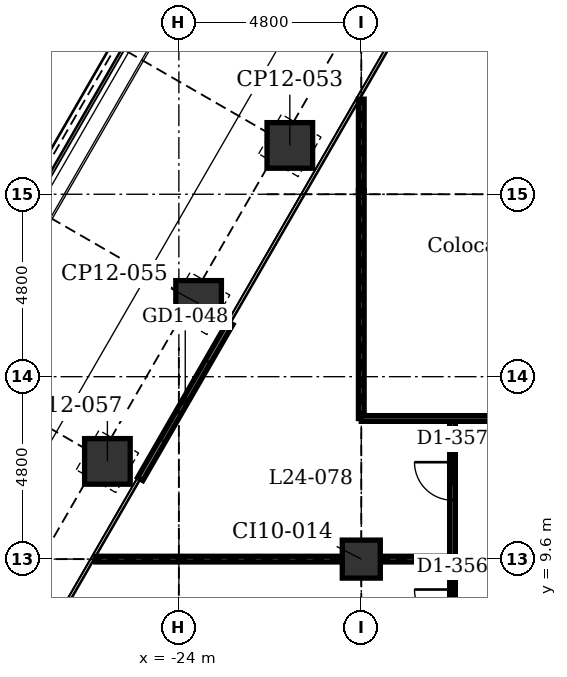
"""IFC4 building model, lengths in metres.
Left out: names, types, materials, properties, quantities, classifications, styles, units other than length and angle.
Written with IfcOpenShell. Run it as: python <this file> out.ifc"""

import sys

from ifc_helpers import new_model, si_unit, direction, frame, frame_2d, origin, origin_2d, place, context, subcontext, project, spatial, rectangle, extrude, element, fill, save


model = new_model("IFC4")
c1 = context("Model", 3, precision=1e-05, world=origin(), true_north=direction((0.0, 1.0)))
c2 = subcontext(c1, "Body", "Model", "MODEL_VIEW")
j1 = project(units=[si_unit("LENGTHUNIT", "METRE"), si_unit("PLANEANGLEUNIT", "RADIAN")], contexts=[c1])
p1 = place(None, origin())
s1 = spatial("IfcSite", under=j1, at=p1, CompositionType="ELEMENT")
p2 = place(p1, origin())
s2 = spatial("IfcBuilding", under=s1, at=p2, CompositionType="ELEMENT")
p3 = place(p2, frame((0.0, 0.0, 122.9)))
s3 = spatial("IfcBuildingStorey", under=s2, at=p3, CompositionType="ELEMENT", Elevation=122.9)
for number, where, z_axis, x_axis in (
    (1, (-25.88, 12.171, -0.2), (0.0, 0.0, 1.0), (0.5, 0.866, 0.0)),
    (2, (-23.48, 16.328, -0.2), (0.0, 0.0, 1.0), (0.5, 0.866, 0.0)),
    (3, (-21.08, 20.485, -0.2), (0.0, 0.0, 1.0), (0.5, 0.866, 0.0)),
):
    element("IfcColumn", number, at=place(p3, frame(where, z_axis=z_axis, x_axis=x_axis)), inside=s3, PredefinedType="COLUMN", context=c2, shape_type="SweptSolid", body=[
        extrude(rectangle(XDim=1.2, YDim=1.2, at=origin_2d()), origin(), (0.0, 0.0, 1.0), 4.4),
    ])
p4 = place(p3, frame((-19.2, 9.6, -0.2), z_axis=(0.0, 0.0, 1.0), x_axis=(1.0, 0.0, 0.0)))
e4 = element("IfcColumn", 4, at=p4, inside=s3, PredefinedType="COLUMN", context=c2, shape_type="SweptSolid", body=[
    extrude(rectangle(XDim=1.0, YDim=1.0, at=origin_2d()), origin(), (0.0, 0.0, 1.0), 4.4),
])
p5 = place(p3, frame((-25.017, 11.707, 0.0), z_axis=(0.0, 0.0, 1.0), x_axis=(0.499978080042, 0.866038058908, 0.0)))
e5 = element("IfcWall", 5, at=p5, inside=s3, PredefinedType="PARTITIONING", context=c2, shape_type="SweptSolid", body=[
    extrude(rectangle(XDim=4.74, YDim=0.16, at=frame_2d((2.37, 0.0))), origin(), (0.0, 0.0, 1.0), 4.2),
])
p6 = place(p5, frame((1.17, 0.0, 0.0)))
e6 = element("IfcOpeningElement", 6, at=p6, cuts=e5, PredefinedType="OPENING", context=c2, shape_type="SweptSolid", body=[
    extrude(rectangle(XDim=2.4, YDim=2.4, at=frame_2d((1.2, 1.2))), frame((0.0, 0.09, 0.0), z_axis=(0.0, -1.0, 0.0), x_axis=(1.0, 0.0, 0.0)), (0.0, 0.0, 1.0), 0.18),
])
p7 = place(p3, frame((-16.8, 3.95, 0.0), z_axis=(0.0, 0.0, 1.0), x_axis=(0.0, 1.0, 0.0)))
e7 = element("IfcWall", 7, at=p7, inside=s3, PredefinedType="PARTITIONING", context=c2, shape_type="SweptSolid", body=[
    extrude(rectangle(XDim=9.35, YDim=0.15, at=frame_2d((4.675, 0.0))), origin(), (0.0, 0.0, 1.0), 4.2),
])
p8 = place(p7, frame((0.625, 0.0, 0.0)))
e8 = element("IfcOpeningElement", 8, at=p8, cuts=e7, PredefinedType="OPENING", context=c2, shape_type="SweptSolid", body=[
    extrude(rectangle(XDim=1.0, YDim=2.1, at=frame_2d((0.5, 1.05))), frame((0.0, 0.085, 0.0), z_axis=(0.0, -1.0, 0.0), x_axis=(1.0, 0.0, 0.0)), (0.0, 0.0, 1.0), 0.17),
])
p9 = place(p7, frame((3.85, 0.0, 0.0)))
e9 = element("IfcOpeningElement", 9, at=p9, cuts=e7, PredefinedType="OPENING", context=c2, shape_type="SweptSolid", body=[
    extrude(rectangle(XDim=1.0, YDim=2.1, at=frame_2d((0.5, 1.05))), frame((0.0, 0.085, 0.0), z_axis=(0.0, -1.0, 0.0), x_axis=(1.0, 0.0, 0.0)), (0.0, 0.0, 1.0), 0.17),
])
p10 = place(p7, frame((7.2, 0.0, 0.0)))
e10 = element("IfcOpeningElement", 10, at=p10, cuts=e7, PredefinedType="OPENING", context=c2, shape_type="SweptSolid", body=[
    extrude(rectangle(XDim=1.0, YDim=2.1, at=frame_2d((0.5, 1.05))), frame((0.0, 0.085, 0.0), z_axis=(0.0, -1.0, 0.0), x_axis=(1.0, 0.0, 0.0)), (0.0, 0.0, 1.0), 0.17),
])
p11 = place(p3, frame((-19.2, 13.3, 0.0), z_axis=(0.0, 0.0, 1.0), x_axis=(0.0, 1.0, 0.0)))
e11 = element("IfcWall", 11, at=p11, inside=s3, PredefinedType="PARTITIONING", context=c2, shape_type="SweptSolid", body=[
    extrude(rectangle(XDim=5.993, YDim=0.15, at=frame_2d((2.997, 0.0))), origin(), (0.0, 0.0, 1.0), 3.743),
])
p12 = place(p3, frame((-19.2, 19.293, 0.0), z_axis=(0.0, 0.0, 1.0), x_axis=(0.0, 1.0, 0.0)))
e12 = element("IfcWall", 12, at=p12, inside=s3, PredefinedType="PARTITIONING", context=c2, shape_type="SweptSolid", body=[
    extrude(rectangle(XDim=2.408, YDim=0.15, at=frame_2d((1.204, 0.0))), origin(), (0.0, 0.0, 1.0), 3.89),
])
p13 = place(p3, frame((-26.187, 9.6, 0.0), z_axis=(0.0, 0.0, 1.0), x_axis=(1.0, 0.0, 0.0)))
e13 = element("IfcWall", 13, at=p13, inside=s3, PredefinedType="PARTITIONING", context=c2, shape_type="SweptSolid", body=[
    extrude(rectangle(XDim=6.487, YDim=0.15, at=frame_2d((3.243, 0.0))), origin(), (0.0, 0.0, 1.0), 3.592),
])
p14 = place(p3, frame((-18.7, 9.6, 0.0), z_axis=(0.0, 0.0, 1.0), x_axis=(1.0, 0.0, 0.0)))
e14 = element("IfcWall", 14, at=p14, inside=s3, PredefinedType="PARTITIONING", context=c2, shape_type="SweptSolid", body=[
    extrude(rectangle(XDim=1.9, YDim=0.15, at=frame_2d((0.95, 0.0))), origin(), (0.0, 0.0, 1.0), 3.592),
])
p15 = place(p3, frame((-19.2, 13.3, 0.0), z_axis=(0.0, 0.0, 1.0), x_axis=(1.0, 0.0, 0.0)))
e15 = element("IfcWall", 15, at=p15, inside=s3, PredefinedType="PARTITIONING", context=c2, shape_type="SweptSolid", body=[
    extrude(rectangle(XDim=36.0, YDim=0.15, at=frame_2d((18.0, 0.0))), origin(), (0.0, 0.0, 1.0), 4.2),
])
p16 = place(p15, frame((4.3, 0.0, 0.0)))
e16 = element("IfcOpeningElement", 16, at=p16, cuts=e15, PredefinedType="OPENING", context=c2, shape_type="SweptSolid", body=[
    extrude(rectangle(XDim=1.0, YDim=2.1, at=frame_2d((0.5, 1.05))), frame((0.0, 0.085, 0.0), z_axis=(0.0, -1.0, 0.0), x_axis=(1.0, 0.0, 0.0)), (0.0, 0.0, 1.0), 0.17),
])
p17 = place(p15, frame((7.9, 0.0, 0.0)))
e17 = element("IfcOpeningElement", 17, at=p17, cuts=e15, PredefinedType="OPENING", context=c2, shape_type="SweptSolid", body=[
    extrude(rectangle(XDim=1.0, YDim=2.1, at=frame_2d((0.5, 1.05))), frame((0.0, 0.085, 0.0), z_axis=(0.0, -1.0, 0.0), x_axis=(1.0, 0.0, 0.0)), (0.0, 0.0, 1.0), 0.17),
])
p18 = place(p15, frame((11.935, 0.0, 0.0)))
e18 = element("IfcOpeningElement", 18, at=p18, cuts=e15, PredefinedType="OPENING", context=c2, shape_type="SweptSolid", body=[
    extrude(rectangle(XDim=1.0, YDim=2.1, at=frame_2d((0.5, 1.05))), frame((0.0, 0.085, 0.0), z_axis=(0.0, -1.0, 0.0), x_axis=(1.0, 0.0, 0.0)), (0.0, 0.0, 1.0), 0.17),
])
p19 = place(p15, frame((15.1, 0.0, 0.0)))
e19 = element("IfcOpeningElement", 19, at=p19, cuts=e15, PredefinedType="OPENING", context=c2, shape_type="SweptSolid", body=[
    extrude(rectangle(XDim=1.0, YDim=2.1, at=frame_2d((0.5, 1.05))), frame((0.0, 0.085, 0.0), z_axis=(0.0, -1.0, 0.0), x_axis=(1.0, 0.0, 0.0)), (0.0, 0.0, 1.0), 0.17),
])
p20 = place(p15, frame((17.675, 0.0, 0.0)))
e20 = element("IfcOpeningElement", 20, at=p20, cuts=e15, PredefinedType="OPENING", context=c2, shape_type="SweptSolid", body=[
    extrude(rectangle(XDim=1.0, YDim=2.1, at=frame_2d((0.5, 1.05))), frame((0.0, 0.085, 0.0), z_axis=(0.0, -1.0, 0.0), x_axis=(1.0, 0.0, 0.0)), (0.0, 0.0, 1.0), 0.17),
])
p21 = place(p15, frame((19.9, 0.0, 0.0)))
e21 = element("IfcOpeningElement", 21, at=p21, cuts=e15, PredefinedType="OPENING", context=c2, shape_type="SweptSolid", body=[
    extrude(rectangle(XDim=1.0, YDim=2.1, at=frame_2d((0.5, 1.05))), frame((0.0, 0.085, 0.0), z_axis=(0.0, -1.0, 0.0), x_axis=(1.0, 0.0, 0.0)), (0.0, 0.0, 1.0), 0.17),
])
p22 = place(p15, frame((22.375, 0.0, 0.0)))
e22 = element("IfcOpeningElement", 22, at=p22, cuts=e15, PredefinedType="OPENING", context=c2, shape_type="SweptSolid", body=[
    extrude(rectangle(XDim=1.0, YDim=2.1, at=frame_2d((0.5, 1.05))), frame((0.0, 0.085, 0.0), z_axis=(0.0, -1.0, 0.0), x_axis=(1.0, 0.0, 0.0)), (0.0, 0.0, 1.0), 0.17),
])
p23 = place(p15, frame((26.625, 0.0, 0.0)))
e23 = element("IfcOpeningElement", 23, at=p23, cuts=e15, PredefinedType="OPENING", context=c2, shape_type="SweptSolid", body=[
    extrude(rectangle(XDim=1.0, YDim=2.1, at=frame_2d((0.5, 1.05))), frame((0.0, 0.085, 0.0), z_axis=(0.0, -1.0, 0.0), x_axis=(1.0, 0.0, 0.0)), (0.0, 0.0, 1.0), 0.17),
])
p24 = place(p15, frame((29.975, 0.0, 0.0)))
e24 = element("IfcOpeningElement", 24, at=p24, cuts=e15, PredefinedType="OPENING", context=c2, shape_type="SweptSolid", body=[
    extrude(rectangle(XDim=1.0, YDim=2.1, at=frame_2d((0.5, 1.05))), frame((0.0, 0.085, 0.0), z_axis=(0.0, -1.0, 0.0), x_axis=(1.0, 0.0, 0.0)), (0.0, 0.0, 1.0), 0.17),
])
p25 = place(p15, frame((34.3, 0.0, 0.0)))
e25 = element("IfcOpeningElement", 25, at=p25, cuts=e15, PredefinedType="OPENING", context=c2, shape_type="SweptSolid", body=[
    extrude(rectangle(XDim=1.0, YDim=2.1, at=frame_2d((0.5, 1.05))), frame((0.0, 0.085, 0.0), z_axis=(0.0, -1.0, 0.0), x_axis=(1.0, 0.0, 0.0)), (0.0, 0.0, 1.0), 0.17),
])
p26 = place(p6, origin())
e26 = element("IfcDoor", 26, at=p26, inside=s3, OperationType="DOUBLE_DOOR_SLIDING", PredefinedType="DOOR", context=c2, shape_type="SweptSolid", body=[
    extrude(rectangle(XDim=2.4, YDim=2.4, at=frame_2d((1.2, 1.2))), frame((0.0, 0.025, 0.0), z_axis=(0.0, -1.0, 0.0), x_axis=(1.0, 0.0, 0.0)), (0.0, 0.0, 1.0), 0.05),
])
fill(e6, e26)
p27 = place(p9, origin())
e27 = element("IfcDoor", 27, at=p27, inside=s3, OperationType="SINGLE_SWING_RIGHT", PredefinedType="DOOR", context=c2, shape_type="SweptSolid", body=[
    extrude(rectangle(XDim=1.0, YDim=2.1, at=frame_2d((0.5, 1.05))), frame((0.0, 0.025, 0.0), z_axis=(0.0, -1.0, 0.0), x_axis=(1.0, 0.0, 0.0)), (0.0, 0.0, 1.0), 0.05),
])
fill(e9, e27)
p28 = place(p10, origin())
e28 = element("IfcDoor", 28, at=p28, inside=s3, OperationType="SINGLE_SWING_RIGHT", PredefinedType="DOOR", context=c2, shape_type="SweptSolid", body=[
    extrude(rectangle(XDim=1.0, YDim=2.1, at=frame_2d((0.5, 1.05))), frame((0.0, 0.025, 0.0), z_axis=(0.0, -1.0, 0.0), x_axis=(1.0, 0.0, 0.0)), (0.0, 0.0, 1.0), 0.05),
])
fill(e10, e28)
save(model, sys.argv[1])
